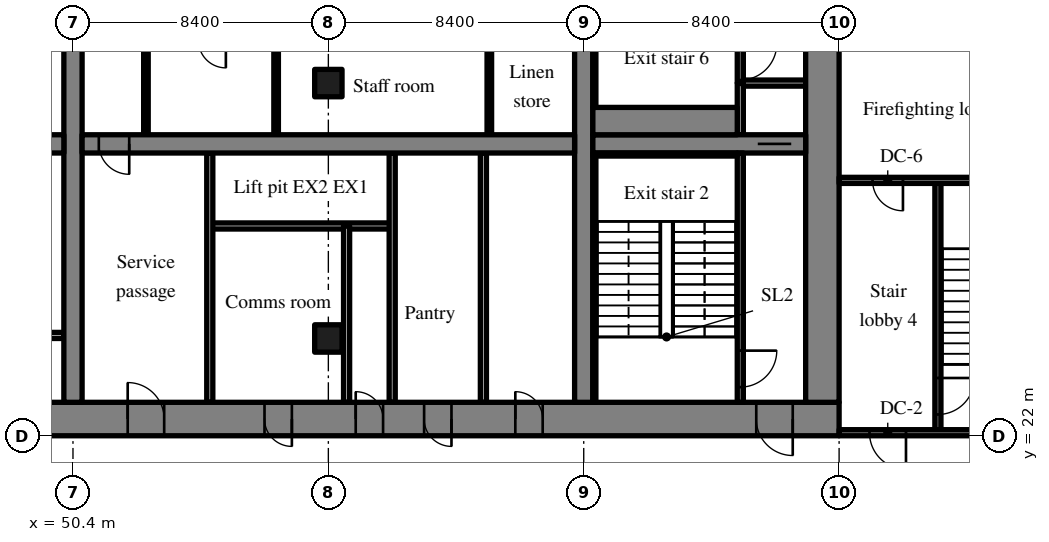
"""IFC4 building model, lengths in metres.
Left out: names, types, materials, properties, quantities, classifications, styles, units other than length and angle.
Written with IfcOpenShell. Run it as: python <this file> out.ifc"""

import sys

from ifc_helpers import new_model, si_unit, direction, frame, frame_2d, origin, origin_2d, place, context, subcontext, project, spatial, rectangle, extrude, source, transform, mapped, element, fill, save


model = new_model("IFC4")
c1 = context("Model", 3, precision=1e-05, world=origin(), true_north=direction((0.0, 1.0)))
c2 = subcontext(c1, "Body", "Model", "MODEL_VIEW")
j1 = project(units=[si_unit("LENGTHUNIT", "METRE"), si_unit("PLANEANGLEUNIT", "RADIAN")], contexts=[c1])
p1 = place(None, origin())
s1 = spatial("IfcSite", under=j1, at=p1, CompositionType="ELEMENT")
p2 = place(p1, origin())
s2 = spatial("IfcBuilding", under=s1, at=p2, CompositionType="ELEMENT")
p3 = place(p2, frame((0.0, 0.0, -4.5)))
s3 = spatial("IfcBuildingStorey", under=s2, at=p3, CompositionType="ELEMENT", Elevation=-4.5)
m1 = source(origin(), c2, "Body", "SweptSolid", [
    extrude(rectangle(XDim=50.4, YDim=1.1, at=frame_2d((25.2, 0.0))), origin(), (0.0, 0.0, 1.0), 4.22),
])
p4 = place(p3, frame((25.2, 22.55, 0.0), z_axis=(0.0, 0.0, 1.0), x_axis=(1.0, 0.0, 0.0)))
e1 = element("IfcWall", 1, at=p4, inside=s3, PredefinedType="SHEAR", context=c2, shape_type="MappedRepresentation", body=[
    mapped(m1, transform((0.0, 0.0, 0.0), scale=1.0)),
])
m2 = source(origin(), c2, "Body", "SweptSolid", [
    extrude(rectangle(XDim=1.8, YDim=2.1, at=frame_2d((0.9, 1.05))), frame((0.0, 0.56, 0.0), z_axis=(0.0, -1.0, 0.0), x_axis=(1.0, 0.0, 0.0)), (0.0, 0.0, 1.0), 1.12),
])
p5 = place(p4, frame((15.9, 0.0, 0.0)))
e2 = element("IfcOpeningElement", 2, at=p5, cuts=e1, PredefinedType="OPENING", context=c2, shape_type="MappedRepresentation", body=[
    mapped(m2, transform((0.0, 0.0, 0.0), scale=1.0)),
])
m3 = source(origin(), c2, "Body", "SweptSolid", [
    extrude(rectangle(XDim=1.2, YDim=2.1, at=frame_2d((0.6, 1.05))), frame((0.0, 0.56, 0.0), z_axis=(0.0, -1.0, 0.0), x_axis=(1.0, 0.0, 0.0)), (0.0, 0.0, 1.0), 1.12),
])
p6 = place(p4, frame((27.0, 0.0, 0.0)))
e3 = element("IfcOpeningElement", 3, at=p6, cuts=e1, PredefinedType="OPENING", context=c2, shape_type="MappedRepresentation", body=[
    mapped(m3, transform((0.0, 0.0, 0.0), scale=1.0)),
])
m4 = source(origin(), c2, "Body", "SweptSolid", [
    extrude(rectangle(XDim=0.9, YDim=2.1, at=frame_2d((0.45, 1.05))), frame((0.0, 0.56, 0.0), z_axis=(0.0, -1.0, 0.0), x_axis=(1.0, 0.0, 0.0)), (0.0, 0.0, 1.0), 1.12),
])
p7 = place(p4, frame((34.5, 0.0, 0.0)))
e4 = element("IfcOpeningElement", 4, at=p7, cuts=e1, PredefinedType="OPENING", context=c2, shape_type="MappedRepresentation", body=[
    mapped(m4, transform((0.0, 0.0, 0.0), scale=1.0)),
])
p8 = place(p4, frame((31.5, 0.0, 0.0)))
e5 = element("IfcOpeningElement", 5, at=p8, cuts=e1, PredefinedType="OPENING", context=c2, shape_type="MappedRepresentation", body=[
    mapped(m4, transform((0.0, 0.0, 0.0), scale=1.0)),
])
p9 = place(p4, frame((39.75, 0.0, 0.0)))
e6 = element("IfcOpeningElement", 6, at=p9, cuts=e1, PredefinedType="OPENING", context=c2, shape_type="MappedRepresentation", body=[
    mapped(m4, transform((0.0, 0.0, 0.0), scale=1.0)),
])
p10 = place(p4, frame((36.75, 0.0, 0.0)))
e7 = element("IfcOpeningElement", 7, at=p10, cuts=e1, PredefinedType="OPENING", context=c2, shape_type="MappedRepresentation", body=[
    mapped(m4, transform((0.0, 0.0, 0.0), scale=1.0)),
])
p11 = place(p4, frame((6.425, 0.0, 0.0)))
e8 = element("IfcOpeningElement", 8, at=p11, cuts=e1, PredefinedType="OPENING", context=c2, shape_type="MappedRepresentation", body=[
    mapped(m3, transform((0.0, 0.0, 0.0), scale=1.0)),
])
p12 = place(p4, frame((47.675, 0.0, 0.0)))
e9 = element("IfcOpeningElement", 9, at=p12, cuts=e1, PredefinedType="OPENING", context=c2, shape_type="MappedRepresentation", body=[
    mapped(m3, transform((0.0, 0.0, 0.0), scale=1.0)),
])
m5 = source(origin(), c2, "Body", "SweptSolid", [
    extrude(rectangle(XDim=17.8, YDim=1.1, at=frame_2d((8.9, 0.0))), origin(), (0.0, 0.0, 1.0), 4.22),
])
p13 = place(p3, frame((75.05, 23.1, 0.0), z_axis=(0.0, 0.0, 1.0), x_axis=(0.0, 1.0, 0.0)))
e10 = element("IfcWall", 10, at=p13, inside=s3, PredefinedType="SHEAR", context=c2, shape_type="MappedRepresentation", body=[
    mapped(m5, transform((0.0, 0.0, 0.0), scale=1.0)),
])
m6 = source(origin(), c2, "Body", "SweptSolid", [
    extrude(rectangle(XDim=17.8, YDim=0.6, at=frame_2d((8.9, 0.0))), origin(), (0.0, 0.0, 1.0), 4.22),
])
p14 = place(p3, frame((50.4, 23.1, 0.0), z_axis=(0.0, 0.0, 1.0), x_axis=(0.0, 1.0, 0.0)))
e11 = element("IfcWall", 11, at=p14, inside=s3, PredefinedType="SHEAR", context=c2, shape_type="MappedRepresentation", body=[
    mapped(m6, transform((0.0, 0.0, 0.0), scale=1.0)),
])
m7 = source(origin(), c2, "Body", "SweptSolid", [
    extrude(rectangle(XDim=1.1, YDim=2.1, at=frame_2d((0.55, 1.05))), frame((0.0, 0.31, 0.0), z_axis=(0.0, -1.0, 0.0), x_axis=(1.0, 0.0, 0.0)), (0.0, 0.0, 1.0), 0.62),
])
p15 = place(p14, frame((12.35, 0.0, 0.0)))
e12 = element("IfcOpeningElement", 12, at=p15, cuts=e11, PredefinedType="OPENING", context=c2, shape_type="MappedRepresentation", body=[
    mapped(m7, transform((0.0, 0.0, 0.0), scale=1.0)),
])
p16 = place(p3, frame((67.2, 23.1, 0.0), z_axis=(0.0, 0.0, 1.0), x_axis=(0.0, 1.0, 0.0)))
e13 = element("IfcWall", 13, at=p16, inside=s3, PredefinedType="SHEAR", context=c2, shape_type="MappedRepresentation", body=[
    mapped(m6, transform((0.0, 0.0, 0.0), scale=1.0)),
])
m8 = source(origin(), c2, "Body", "SweptSolid", [
    extrude(rectangle(XDim=16.2, YDim=0.6, at=frame_2d((8.1, 0.0))), origin(), (0.0, 0.0, 1.0), 4.22),
])
p17 = place(p3, frame((33.9, 31.6, 0.0), z_axis=(0.0, 0.0, 1.0), x_axis=(1.0, 0.0, 0.0)))
e14 = element("IfcWall", 14, at=p17, inside=s3, PredefinedType="SHEAR", context=c2, shape_type="MappedRepresentation", body=[
    mapped(m8, transform((0.0, 0.0, 0.0), scale=1.0)),
])
m9 = source(origin(), c2, "Body", "SweptSolid", [
    extrude(rectangle(XDim=1.0, YDim=2.1, at=frame_2d((0.5, 1.05))), frame((0.0, 0.31, 0.0), z_axis=(0.0, -1.0, 0.0), x_axis=(1.0, 0.0, 0.0)), (0.0, 0.0, 1.0), 0.62),
])
p18 = place(p17, frame((14.65, 0.0, 0.0)))
e15 = element("IfcOpeningElement", 15, at=p18, cuts=e14, PredefinedType="OPENING", context=c2, shape_type="MappedRepresentation", body=[
    mapped(m9, transform((0.0, 0.0, 0.0), scale=1.0)),
])
m10 = source(origin(), c2, "Body", "SweptSolid", [
    extrude(rectangle(XDim=16.2, YDim=0.6, at=frame_2d((8.1, 0.0))), origin(), (0.0, 0.0, 1.0), 4.22),
])
p19 = place(p3, frame((50.7, 31.6, 0.0), z_axis=(0.0, 0.0, 1.0), x_axis=(1.0, 0.0, 0.0)))
e16 = element("IfcWall", 16, at=p19, inside=s3, PredefinedType="SHEAR", context=c2, shape_type="MappedRepresentation", body=[
    mapped(m10, transform((0.0, 0.0, 0.0), scale=1.0)),
])
p20 = place(p19, frame((0.55, 0.0, 0.0)))
e17 = element("IfcOpeningElement", 17, at=p20, cuts=e16, PredefinedType="OPENING", context=c2, shape_type="MappedRepresentation", body=[
    mapped(m9, transform((0.0, 0.0, 0.0), scale=1.0)),
])
m11 = source(origin(), c2, "Body", "SweptSolid", [
    extrude(rectangle(XDim=7.0, YDim=0.6, at=frame_2d((3.5, 0.0))), origin(), (0.0, 0.0, 1.0), 4.22),
])
p21 = place(p3, frame((67.5, 31.6, 0.0), z_axis=(0.0, 0.0, 1.0), x_axis=(1.0, 0.0, 0.0)))
e18 = element("IfcWall", 18, at=p21, inside=s3, PredefinedType="SHEAR", context=c2, shape_type="MappedRepresentation", body=[
    mapped(m11, transform((0.0, 0.0, 0.0), scale=1.0)),
])
p22 = place(p21, frame((5.425, 0.0, 0.0)))
e19 = element("IfcOpeningElement", 19, at=p22, cuts=e18, PredefinedType="OPENING", context=c2, shape_type="MappedRepresentation", body=[
    mapped(m7, transform((0.0, 0.0, 0.0), scale=1.0)),
])
m12 = source(origin(), c2, "Body", "SweptSolid", [
    extrude(rectangle(XDim=0.9, YDim=0.9, at=origin_2d()), origin(), (0.0, 0.0, 1.0), 4.22),
])
for number, where, z_axis, x_axis in (
    (20, (58.8, 25.2, 0.0), (0.0, 0.0, 1.0), (1.0, 0.0, 0.0)),
    (21, (58.8, 33.6, 0.0), (0.0, 0.0, 1.0), (1.0, 0.0, 0.0)),
):
    element("IfcColumn", number, at=place(p3, frame(where, z_axis=z_axis, x_axis=x_axis)), inside=s3, PredefinedType="COLUMN", context=c2, shape_type="MappedRepresentation", body=[
        mapped(m12, transform((0.0, 0.0, 0.0), scale=1.0)),
    ])
m13 = source(origin(), c2, "Body", "SweptSolid", [
    extrude(rectangle(XDim=6.0, YDim=0.2, at=frame_2d((3.0, 0.0))), origin(), (0.0, 0.0, 1.0), 4.22),
])
p23 = place(p3, frame((44.1, 25.3, 0.0), z_axis=(0.0, 0.0, 1.0), x_axis=(1.0, 0.0, 0.0)))
e22 = element("IfcWall", 22, at=p23, inside=s3, PredefinedType="SOLIDWALL", context=c2, shape_type="MappedRepresentation", body=[
    mapped(m13, transform((0.0, 0.0, 0.0), scale=1.0)),
])
m14 = source(origin(), c2, "Body", "SweptSolid", [
    extrude(rectangle(XDim=1.1, YDim=2.1, at=frame_2d((0.55, 1.05))), frame((0.0, 0.11, 0.0), z_axis=(0.0, -1.0, 0.0), x_axis=(1.0, 0.0, 0.0)), (0.0, 0.0, 1.0), 0.22),
])
p24 = place(p23, frame((0.95, 0.0, 0.0)))
e23 = element("IfcOpeningElement", 23, at=p24, cuts=e22, PredefinedType="OPENING", context=c2, shape_type="MappedRepresentation", body=[
    mapped(m14, transform((0.0, 0.0, 0.0), scale=1.0)),
])
p25 = place(p23, frame((3.95, 0.0, 0.0)))
e24 = element("IfcOpeningElement", 24, at=p25, cuts=e22, PredefinedType="OPENING", context=c2, shape_type="MappedRepresentation", body=[
    mapped(m14, transform((0.0, 0.0, 0.0), scale=1.0)),
])
p26 = place(p3, frame((60.9, 28.9, 0.0), z_axis=(0.0, 0.0, 1.0), x_axis=(-1.0, 0.0, 0.0)))
e25 = element("IfcWall", 25, at=p26, inside=s3, PredefinedType="SOLIDWALL", context=c2, shape_type="MappedRepresentation", body=[
    mapped(m13, transform((0.0, 0.0, 0.0), scale=1.0)),
])
m15 = source(origin(), c2, "Body", "SweptSolid", [
    extrude(rectangle(XDim=8.2, YDim=0.2, at=frame_2d((4.1, 0.0))), origin(), (0.0, 0.0, 1.0), 4.22),
])
for number, where, z_axis, x_axis in (
    (26, (54.9, 23.1, 0.0), (0.0, 0.0, 1.0), (0.0, 1.0, 0.0)),
    (27, (60.9, 23.1, 0.0), (0.0, 0.0, 1.0), (0.0, 1.0, 0.0)),
):
    element("IfcWall", number, at=place(p3, frame(where, z_axis=z_axis, x_axis=x_axis)), inside=s3, PredefinedType="PARTITIONING", context=c2, shape_type="MappedRepresentation", body=[
        mapped(m15, transform((0.0, 0.0, 0.0), scale=1.0)),
    ])
m16 = source(origin(), c2, "Body", "SweptSolid", [
    extrude(rectangle(XDim=5.8, YDim=0.2, at=frame_2d((2.9, 0.0))), origin(), (0.0, 0.0, 1.0), 4.22),
])
p27 = place(p3, frame((59.4, 23.1, 0.0), z_axis=(0.0, 0.0, 1.0), x_axis=(0.0, 1.0, 0.0)))
e28 = element("IfcWall", 28, at=p27, inside=s3, PredefinedType="PARTITIONING", context=c2, shape_type="MappedRepresentation", body=[
    mapped(m16, transform((0.0, 0.0, 0.0), scale=1.0)),
])
p28 = place(p3, frame((63.9, 23.1, 0.0), z_axis=(0.0, 0.0, 1.0), x_axis=(0.0, 1.0, 0.0)))
e29 = element("IfcWall", 29, at=p28, inside=s3, PredefinedType="PARTITIONING", context=c2, shape_type="MappedRepresentation", body=[
    mapped(m15, transform((0.0, 0.0, 0.0), scale=1.0)),
])
m17 = source(origin(), c2, "Body", "SweptSolid", [
    extrude(rectangle(XDim=3.1, YDim=0.15, at=frame_2d((1.55, 0.0))), origin(), (0.0, 0.0, 1.0), 4.22),
])
for number, where, z_axis, x_axis in (
    (30, (52.8, 31.9, 0.0), (0.0, 0.0, 1.0), (0.0, 1.0, 0.0)),
    (31, (64.095, 31.9, 0.0), (0.0, 0.0, 1.0), (0.0, 1.0, 0.0)),
    (32, (57.082, 31.9, 0.0), (0.0, 0.0, 1.0), (0.0, 1.0, 0.0)),
):
    element("IfcWall", number, at=place(p3, frame(where, z_axis=z_axis, x_axis=x_axis)), inside=s3, PredefinedType="PARTITIONING", context=c2, shape_type="MappedRepresentation", body=[
        mapped(m17, transform((0.0, 0.0, 0.0), scale=1.0)),
    ])
m18 = source(origin(), c2, "Body", "SweptSolid", [
    extrude(rectangle(XDim=8.2, YDim=0.2, at=frame_2d((4.1, 0.0))), origin(), (0.0, 0.0, 1.0), 4.22),
])
p29 = place(p3, frame((72.35, 23.1, 0.0), z_axis=(0.0, 0.0, 1.0), x_axis=(0.0, 1.0, 0.0)))
e33 = element("IfcWall", 33, at=p29, inside=s3, PredefinedType="SOLIDWALL", context=c2, shape_type="MappedRepresentation", body=[
    mapped(m18, transform((0.0, 0.0, 0.0), scale=1.0)),
])
m19 = source(origin(), c2, "Body", "SweptSolid", [
    extrude(rectangle(XDim=1.2, YDim=2.1, at=frame_2d((0.6, 1.05))), frame((0.0, 0.11, 0.0), z_axis=(0.0, -1.0, 0.0), x_axis=(1.0, 0.0, 0.0)), (0.0, 0.0, 1.0), 0.22),
])
p30 = place(p29, frame((0.5, 0.0, 0.0)))
e34 = element("IfcOpeningElement", 34, at=p30, cuts=e33, PredefinedType="OPENING", context=c2, shape_type="MappedRepresentation", body=[
    mapped(m19, transform((0.0, 0.0, 0.0), scale=1.0)),
])
m20 = source(origin(), c2, "Body", "SweptSolid", [
    extrude(rectangle(XDim=1.7, YDim=0.2, at=frame_2d((0.85, 0.0))), origin(), (0.0, 0.0, 1.0), 4.22),
])
p31 = place(p3, frame((72.35, 31.9, 0.0), z_axis=(0.0, 0.0, 1.0), x_axis=(0.0, 1.0, 0.0)))
e35 = element("IfcWall", 35, at=p31, inside=s3, PredefinedType="SOLIDWALL", context=c2, shape_type="MappedRepresentation", body=[
    mapped(m20, transform((0.0, 0.0, 0.0), scale=1.0)),
])
m21 = source(origin(), c2, "Body", "SweptSolid", [
    extrude(rectangle(XDim=2.05, YDim=0.2, at=frame_2d((1.025, 0.0))), origin(), (0.0, 0.0, 1.0), 4.22),
])
p32 = place(p3, frame((72.45, 33.6, 0.0), z_axis=(0.0, 0.0, 1.0), x_axis=(1.0, 0.0, 0.0)))
e36 = element("IfcWall", 36, at=p32, inside=s3, PredefinedType="SOLIDWALL", context=c2, shape_type="MappedRepresentation", body=[
    mapped(m21, transform((0.0, 0.0, 0.0), scale=1.0)),
])
m22 = source(origin(), c2, "Body", "SweptSolid", [
    extrude(rectangle(XDim=7.3, YDim=0.2, at=frame_2d((3.65, 0.0))), origin(), (0.0, 0.0, 1.0), 4.22),
])
p33 = place(p3, frame((72.35, 33.6, 0.0), z_axis=(0.0, 0.0, 1.0), x_axis=(0.0, 1.0, 0.0)))
e37 = element("IfcWall", 37, at=p33, inside=s3, PredefinedType="SOLIDWALL", context=c2, shape_type="MappedRepresentation", body=[
    mapped(m22, transform((0.0, 0.0, 0.0), scale=1.0)),
])
p34 = place(p33, frame((0.1, 0.0, 0.0)))
e38 = element("IfcOpeningElement", 38, at=p34, cuts=e37, PredefinedType="OPENING", context=c2, shape_type="MappedRepresentation", body=[
    mapped(m19, transform((0.0, 0.0, 0.0), scale=1.0)),
])
m23 = source(origin(), c2, "Body", "SweptSolid", [
    extrude(rectangle(XDim=8.3, YDim=0.2, at=frame_2d((4.15, 0.0))), origin(), (0.0, 0.0, 1.0), 4.22),
])
p35 = place(p3, frame((78.85, 22.1, 0.0), z_axis=(0.0, 0.0, 1.0), x_axis=(0.0, 1.0, 0.0)))
e39 = element("IfcWall", 39, at=p35, inside=s3, PredefinedType="SOLIDWALL", context=c2, shape_type="MappedRepresentation", body=[
    mapped(m23, transform((0.0, 0.0, 0.0), scale=1.0)),
])
p36 = place(p35, frame((0.6, 0.0, 0.0)))
e40 = element("IfcOpeningElement", 40, at=p36, cuts=e39, PredefinedType="OPENING", context=c2, shape_type="MappedRepresentation", body=[
    mapped(m19, transform((0.0, 0.0, 0.0), scale=1.0)),
])
m24 = source(origin(), c2, "Body", "SweptSolid", [
    extrude(rectangle(XDim=8.175, YDim=0.2, at=frame_2d((4.087, 0.0))), origin(), (0.0, 0.0, 1.0), 4.22),
])
p37 = place(p3, frame((83.775, 22.1, 0.0), z_axis=(0.0, 0.0, 1.0), x_axis=(-1.0, 0.0, 0.0)))
e41 = element("IfcWall", 41, at=p37, inside=s3, PredefinedType="SOLIDWALL", context=c2, shape_type="MappedRepresentation", body=[
    mapped(m24, transform((0.0, 0.0, 0.0), scale=1.0)),
])
p38 = place(p37, frame((5.975, 0.0, 0.0)))
e42 = element("IfcOpeningElement", 42, at=p38, cuts=e41, PredefinedType="OPENING", context=c2, shape_type="MappedRepresentation", body=[
    mapped(m19, transform((0.0, 0.0, 0.0), scale=1.0)),
])
p39 = place(p3, frame((83.775, 30.4, 0.0), z_axis=(0.0, 0.0, 1.0), x_axis=(-1.0, 0.0, 0.0)))
e43 = element("IfcWall", 43, at=p39, inside=s3, PredefinedType="SOLIDWALL", context=c2, shape_type="MappedRepresentation", body=[
    mapped(m24, transform((0.0, 0.0, 0.0), scale=1.0)),
])
m25 = source(origin(), c2, "Body", "SweptSolid", [
    extrude(rectangle(XDim=1.0, YDim=2.1, at=frame_2d((0.5, 1.05))), frame((0.0, 0.11, 0.0), z_axis=(0.0, -1.0, 0.0), x_axis=(1.0, 0.0, 0.0)), (0.0, 0.0, 1.0), 0.22),
])
p40 = place(p39, frame((6.075, 0.0, 0.0)))
e44 = element("IfcOpeningElement", 44, at=p40, cuts=e43, PredefinedType="OPENING", context=c2, shape_type="MappedRepresentation", body=[
    mapped(m25, transform((0.0, 0.0, 0.0), scale=1.0)),
])
m26 = source(origin(), c2, "Body", "SweptSolid", [
    extrude(rectangle(XDim=4.75, YDim=0.1, at=frame_2d((2.375, 0.0))), origin(), (0.0, 0.0, 1.0), 4.22),
])
p41 = place(p3, frame((67.5, 31.25, 0.0), z_axis=(0.0, 0.0, 1.0), x_axis=(1.0, 0.0, 0.0)))
e45 = element("IfcWall", 45, at=p41, inside=s3, PredefinedType="SOLIDWALL", context=c2, shape_type="MappedRepresentation", body=[
    mapped(m26, transform((0.0, 0.0, 0.0), scale=1.0)),
])
m27 = source(origin(), c2, "Body", "SweptSolid", [
    extrude(rectangle(XDim=8.1, YDim=0.1, at=frame_2d((4.05, 0.0))), origin(), (0.0, 0.0, 1.0), 4.22),
])
p42 = place(p3, frame((67.55, 23.1, 0.0), z_axis=(0.0, 0.0, 1.0), x_axis=(0.0, 1.0, 0.0)))
e46 = element("IfcWall", 46, at=p42, inside=s3, PredefinedType="SOLIDWALL", context=c2, shape_type="MappedRepresentation", body=[
    mapped(m27, transform((0.0, 0.0, 0.0), scale=1.0)),
])
m28 = source(origin(), c2, "Body", "SweptSolid", [
    extrude(rectangle(XDim=4.75, YDim=0.9, at=frame_2d((2.375, 0.0))), origin(), (0.0, 0.0, 1.0), 4.22),
])
p43 = place(p3, frame((67.5, 32.35, 0.0), z_axis=(0.0, 0.0, 1.0), x_axis=(1.0, 0.0, 0.0)))
e47 = element("IfcWall", 47, at=p43, inside=s3, PredefinedType="SOLIDWALL", context=c2, shape_type="MappedRepresentation", body=[
    mapped(m28, transform((0.0, 0.0, 0.0), scale=1.0)),
])
p44 = place(p3, frame((67.55, 32.8, 0.0), z_axis=(0.0, 0.0, 1.0), x_axis=(0.0, 1.0, 0.0)))
e48 = element("IfcWall", 48, at=p44, inside=s3, PredefinedType="SOLIDWALL", context=c2, shape_type="MappedRepresentation", body=[
    mapped(m27, transform((0.0, 0.0, 0.0), scale=1.0)),
])
m29 = source(origin(), c2, "Body", "SweptSolid", [
    extrude(rectangle(XDim=1.2, YDim=2.1, at=frame_2d((0.6, 1.05))), frame((0.0, 0.325, 0.0), z_axis=(0.0, -1.0, 0.0), x_axis=(1.0, 0.0, 0.0)), (0.0, 0.0, 1.0), 0.05),
])
p45 = place(p6, origin())
e49 = element("IfcDoor", 49, at=p45, inside=s3, OperationType="SINGLE_SWING_LEFT", PredefinedType="DOOR", context=c2, shape_type="MappedRepresentation", body=[
    mapped(m29, transform((0.0, 0.0, 0.0), scale=1.0)),
])
fill(e3, e49)
m30 = source(origin(), c2, "Body", "SweptSolid", [
    extrude(rectangle(XDim=1.0, YDim=2.1, at=frame_2d((0.5, 1.05))), frame((0.0, 0.025, 0.0), z_axis=(0.0, -1.0, 0.0), x_axis=(1.0, 0.0, 0.0)), (0.0, 0.0, 1.0), 0.05),
])
p46 = place(p20, origin())
e50 = element("IfcDoor", 50, at=p46, inside=s3, OperationType="SINGLE_SWING_RIGHT", PredefinedType="DOOR", context=c2, shape_type="MappedRepresentation", body=[
    mapped(m30, transform((0.0, 0.0, 0.0), scale=1.0)),
])
fill(e17, e50)
m31 = source(origin(), c2, "Body", "SweptSolid", [
    extrude(rectangle(XDim=0.9, YDim=2.1, at=frame_2d((0.45, 1.05))), frame((0.0, 0.325, 0.0), z_axis=(0.0, -1.0, 0.0), x_axis=(1.0, 0.0, 0.0)), (0.0, 0.0, 1.0), 0.05),
])
p47 = place(p7, origin())
e51 = element("IfcDoor", 51, at=p47, inside=s3, OperationType="SINGLE_SWING_LEFT", PredefinedType="DOOR", context=c2, shape_type="MappedRepresentation", body=[
    mapped(m31, transform((0.0, 0.0, 0.0), scale=1.0)),
])
fill(e4, e51)
p48 = place(p8, origin())
e52 = element("IfcDoor", 52, at=p48, inside=s3, OperationType="SINGLE_SWING_RIGHT", PredefinedType="DOOR", context=c2, shape_type="MappedRepresentation", body=[
    mapped(m31, transform((0.0, 0.0, 0.0), scale=1.0)),
])
fill(e5, e52)
p49 = place(p9, origin())
e53 = element("IfcDoor", 53, at=p49, inside=s3, OperationType="SINGLE_SWING_LEFT", PredefinedType="DOOR", context=c2, shape_type="MappedRepresentation", body=[
    mapped(m31, transform((0.0, 0.0, 0.0), scale=1.0)),
])
fill(e6, e53)
p50 = place(p10, origin())
e54 = element("IfcDoor", 54, at=p50, inside=s3, OperationType="SINGLE_SWING_RIGHT", PredefinedType="DOOR", context=c2, shape_type="MappedRepresentation", body=[
    mapped(m31, transform((0.0, 0.0, 0.0), scale=1.0)),
])
fill(e7, e54)
m32 = source(origin(), c2, "Body", "SweptSolid", [
    extrude(rectangle(XDim=1.2, YDim=2.1, at=frame_2d((0.6, 1.05))), frame((0.0, 0.025, 0.0), z_axis=(0.0, -1.0, 0.0), x_axis=(1.0, 0.0, 0.0)), (0.0, 0.0, 1.0), 0.05),
])
p51 = place(p30, origin())
e55 = element("IfcDoor", 55, at=p51, inside=s3, OperationType="SINGLE_SWING_RIGHT", PredefinedType="DOOR", context=c2, shape_type="MappedRepresentation", body=[
    mapped(m32, transform((0.0, 0.0, 0.0), scale=1.0)),
])
fill(e34, e55)
p52 = place(p12, origin())
e56 = element("IfcDoor", 56, at=p52, inside=s3, OperationType="SINGLE_SWING_RIGHT", PredefinedType="DOOR", context=c2, shape_type="MappedRepresentation", body=[
    mapped(m29, transform((0.0, 0.0, 0.0), scale=1.0)),
])
fill(e9, e56)
m33 = source(origin(), c2, "Body", "SweptSolid", [
    extrude(rectangle(XDim=1.1, YDim=2.1, at=frame_2d((0.55, 1.05))), frame((0.0, 0.025, 0.0), z_axis=(0.0, -1.0, 0.0), x_axis=(1.0, 0.0, 0.0)), (0.0, 0.0, 1.0), 0.05),
])
p53 = place(p22, origin())
e57 = element("IfcDoor", 57, at=p53, inside=s3, OperationType="SLIDING_TO_RIGHT", PredefinedType="DOOR", context=c2, shape_type="MappedRepresentation", body=[
    mapped(m33, transform((0.0, 0.0, 0.0), scale=1.0)),
])
fill(e19, e57)
p54 = place(p34, origin())
e58 = element("IfcDoor", 58, at=p54, inside=s3, OperationType="SINGLE_SWING_RIGHT", PredefinedType="DOOR", context=c2, shape_type="MappedRepresentation", body=[
    mapped(m32, transform((0.0, 0.0, 0.0), scale=1.0)),
])
fill(e38, e58)
p55 = place(p36, origin())
e59 = element("IfcDoor", 59, at=p55, inside=s3, OperationType="SINGLE_SWING_RIGHT", PredefinedType="DOOR", context=c2, shape_type="MappedRepresentation", body=[
    mapped(m32, transform((0.0, 0.0, 0.0), scale=1.0)),
])
fill(e40, e59)
p56 = place(p38, origin())
e60 = element("IfcDoor", 60, at=p56, inside=s3, OperationType="SINGLE_SWING_LEFT", PredefinedType="DOOR", context=c2, shape_type="MappedRepresentation", body=[
    mapped(m32, transform((0.0, 0.0, 0.0), scale=1.0)),
])
fill(e42, e60)
p57 = place(p40, origin())
e61 = element("IfcDoor", 61, at=p57, inside=s3, OperationType="SINGLE_SWING_LEFT", PredefinedType="DOOR", context=c2, shape_type="MappedRepresentation", body=[
    mapped(m30, transform((0.0, 0.0, 0.0), scale=1.0)),
])
fill(e44, e61)
save(model, sys.argv[1])
